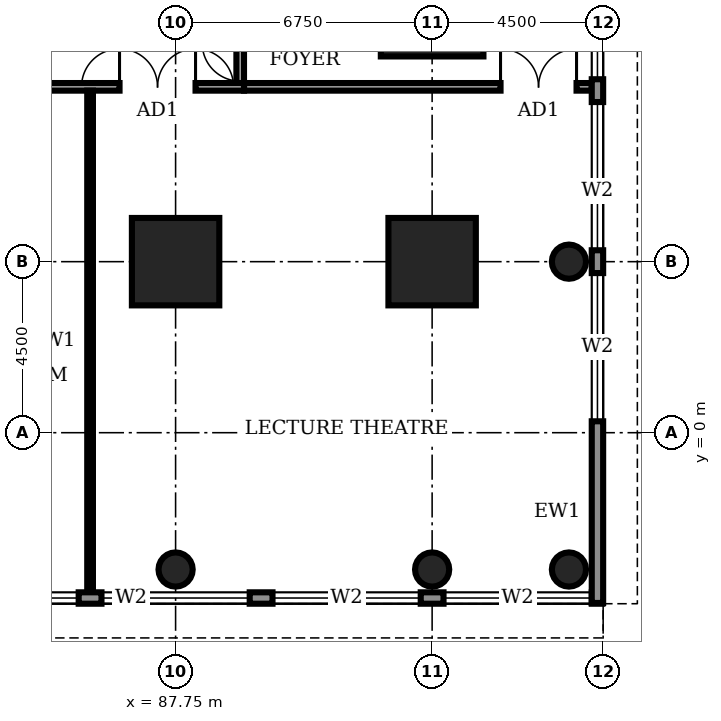
"""IFC4 building model, lengths in metres.
Left out: names, types, materials, properties, quantities, classifications, styles, units other than length and angle.
Written with IfcOpenShell. Run it as: python <this file> out.ifc"""

import sys

from ifc_helpers import new_model, si_unit, direction, frame, frame_2d, origin, origin_2d, place, context, subcontext, project, spatial, rectangle, circle, extrude, element, fill, save


model = new_model("IFC4")
c1 = context("Model", 3, precision=1e-05, world=origin(), true_north=direction((0.0, 1.0)))
c2 = subcontext(c1, "Body", "Model", "MODEL_VIEW")
j1 = project(units=[si_unit("LENGTHUNIT", "METRE"), si_unit("PLANEANGLEUNIT", "RADIAN")], contexts=[c1])
p1 = place(None, origin())
s1 = spatial("IfcSite", under=j1, at=p1, CompositionType="ELEMENT")
p2 = place(p1, origin())
s2 = spatial("IfcBuilding", under=s1, at=p2, CompositionType="ELEMENT")
p3 = place(p2, frame((0.0, 0.0, 6.0)))
s3 = spatial("IfcBuildingStorey", under=s2, at=p3, CompositionType="ELEMENT", Elevation=6.0)
for number, where, z_axis, x_axis in (
    (1, (87.75, 4.5, 0.0), (0.0, 0.0, 1.0), (1.0, 0.0, 0.0)),
    (2, (94.5, 4.5, 0.0), (0.0, 0.0, 1.0), (1.0, 0.0, 0.0)),
):
    element("IfcColumn", number, at=place(p3, frame(where, z_axis=z_axis, x_axis=x_axis)), inside=s3, PredefinedType="COLUMN", context=c2, shape_type="SweptSolid", body=[
        extrude(rectangle(XDim=2.3, YDim=2.3, at=origin_2d()), origin(), (0.0, 0.0, 1.0), 5.0),
    ])
p4 = place(p3, frame((94.5, 11.25, 0.0), z_axis=(0.0, 0.0, 1.0), x_axis=(1.0, 0.0, 0.0)))
e3 = element("IfcColumn", 3, at=p4, inside=s3, PredefinedType="COLUMN", context=c2, shape_type="SweptSolid", body=[
    extrude(rectangle(XDim=2.7, YDim=2.7, at=origin_2d()), origin(), (0.0, 0.0, 1.0), 5.0),
])
for number, where, z_axis, x_axis in (
    (4, (87.75, -3.6, 0.0), (0.0, 0.0, 1.0), (1.0, 0.0, 0.0)),
    (5, (94.5, -3.6, 0.0), (0.0, 0.0, 1.0), (1.0, 0.0, 0.0)),
    (6, (98.1, -3.6, 0.0), (0.0, 0.0, 1.0), (1.0, 0.0, 0.0)),
    (7, (98.1, 4.5, 0.0), (0.0, 0.0, 1.0), (1.0, 0.0, 0.0)),
):
    element("IfcColumn", number, at=place(p3, frame(where, z_axis=z_axis, x_axis=x_axis)), inside=s3, PredefinedType="COLUMN", context=c2, shape_type="SweptSolid", body=[
        extrude(circle(Radius=0.45, at=origin_2d()), origin(), (0.0, 0.0, 1.0), 5.0),
    ])
p5 = place(p3, frame((0.02, -4.35, 0.0), z_axis=(0.0, 0.0, 1.0), x_axis=(1.0, 0.0, 0.0)))
e8 = element("IfcWall", 8, at=p5, inside=s3, PredefinedType="STANDARD", context=c2, shape_type="SweptSolid", body=[
    extrude(rectangle(XDim=98.96, YDim=0.3, at=frame_2d((49.48, 0.0))), origin(), (0.0, 0.0, 1.0), 4.7),
])
p6 = place(p5, frame((4.78, 0.0, 0.6)))
e9 = element("IfcOpeningElement", 9, at=p6, cuts=e8, PredefinedType="OPENING", context=c2, shape_type="SweptSolid", body=[
    extrude(rectangle(XDim=3.9, YDim=2.6, at=frame_2d((1.95, 1.3))), frame((0.0, 0.16, 0.0), z_axis=(0.0, -1.0, 0.0), x_axis=(1.0, 0.0, 0.0)), (0.0, 0.0, 1.0), 0.32),
])
p7 = place(p5, frame((9.28, 0.0, 0.6)))
e10 = element("IfcOpeningElement", 10, at=p7, cuts=e8, PredefinedType="OPENING", context=c2, shape_type="SweptSolid", body=[
    extrude(rectangle(XDim=3.9, YDim=2.6, at=frame_2d((1.95, 1.3))), frame((0.0, 0.16, 0.0), z_axis=(0.0, -1.0, 0.0), x_axis=(1.0, 0.0, 0.0)), (0.0, 0.0, 1.0), 0.32),
])
p8 = place(p5, frame((13.78, 0.0, 0.6)))
e11 = element("IfcOpeningElement", 11, at=p8, cuts=e8, PredefinedType="OPENING", context=c2, shape_type="SweptSolid", body=[
    extrude(rectangle(XDim=3.9, YDim=2.6, at=frame_2d((1.95, 1.3))), frame((0.0, 0.16, 0.0), z_axis=(0.0, -1.0, 0.0), x_axis=(1.0, 0.0, 0.0)), (0.0, 0.0, 1.0), 0.32),
])
p9 = place(p5, frame((18.28, 0.0, 0.6)))
e12 = element("IfcOpeningElement", 12, at=p9, cuts=e8, PredefinedType="OPENING", context=c2, shape_type="SweptSolid", body=[
    extrude(rectangle(XDim=3.9, YDim=2.6, at=frame_2d((1.95, 1.3))), frame((0.0, 0.16, 0.0), z_axis=(0.0, -1.0, 0.0), x_axis=(1.0, 0.0, 0.0)), (0.0, 0.0, 1.0), 0.32),
])
p10 = place(p5, frame((22.78, 0.0, 0.6)))
e13 = element("IfcOpeningElement", 13, at=p10, cuts=e8, PredefinedType="OPENING", context=c2, shape_type="SweptSolid", body=[
    extrude(rectangle(XDim=3.9, YDim=2.6, at=frame_2d((1.95, 1.3))), frame((0.0, 0.16, 0.0), z_axis=(0.0, -1.0, 0.0), x_axis=(1.0, 0.0, 0.0)), (0.0, 0.0, 1.0), 0.32),
])
p11 = place(p5, frame((27.28, 0.0, 0.6)))
e14 = element("IfcOpeningElement", 14, at=p11, cuts=e8, PredefinedType="OPENING", context=c2, shape_type="SweptSolid", body=[
    extrude(rectangle(XDim=3.9, YDim=2.6, at=frame_2d((1.95, 1.3))), frame((0.0, 0.16, 0.0), z_axis=(0.0, -1.0, 0.0), x_axis=(1.0, 0.0, 0.0)), (0.0, 0.0, 1.0), 0.32),
])
p12 = place(p5, frame((31.78, 0.0, 0.6)))
e15 = element("IfcOpeningElement", 15, at=p12, cuts=e8, PredefinedType="OPENING", context=c2, shape_type="SweptSolid", body=[
    extrude(rectangle(XDim=3.9, YDim=2.6, at=frame_2d((1.95, 1.3))), frame((0.0, 0.16, 0.0), z_axis=(0.0, -1.0, 0.0), x_axis=(1.0, 0.0, 0.0)), (0.0, 0.0, 1.0), 0.32),
])
p13 = place(p5, frame((36.28, 0.0, 0.6)))
e16 = element("IfcOpeningElement", 16, at=p13, cuts=e8, PredefinedType="OPENING", context=c2, shape_type="SweptSolid", body=[
    extrude(rectangle(XDim=3.9, YDim=2.6, at=frame_2d((1.95, 1.3))), frame((0.0, 0.16, 0.0), z_axis=(0.0, -1.0, 0.0), x_axis=(1.0, 0.0, 0.0)), (0.0, 0.0, 1.0), 0.32),
])
p14 = place(p5, frame((40.78, 0.0, 0.6)))
e17 = element("IfcOpeningElement", 17, at=p14, cuts=e8, PredefinedType="OPENING", context=c2, shape_type="SweptSolid", body=[
    extrude(rectangle(XDim=3.9, YDim=2.6, at=frame_2d((1.95, 1.3))), frame((0.0, 0.16, 0.0), z_axis=(0.0, -1.0, 0.0), x_axis=(1.0, 0.0, 0.0)), (0.0, 0.0, 1.0), 0.32),
])
p15 = place(p5, frame((45.28, 0.0, 0.6)))
e18 = element("IfcOpeningElement", 18, at=p15, cuts=e8, PredefinedType="OPENING", context=c2, shape_type="SweptSolid", body=[
    extrude(rectangle(XDim=3.9, YDim=2.6, at=frame_2d((1.95, 1.3))), frame((0.0, 0.16, 0.0), z_axis=(0.0, -1.0, 0.0), x_axis=(1.0, 0.0, 0.0)), (0.0, 0.0, 1.0), 0.32),
])
p16 = place(p5, frame((49.78, 0.0, 0.6)))
e19 = element("IfcOpeningElement", 19, at=p16, cuts=e8, PredefinedType="OPENING", context=c2, shape_type="SweptSolid", body=[
    extrude(rectangle(XDim=3.9, YDim=2.6, at=frame_2d((1.95, 1.3))), frame((0.0, 0.16, 0.0), z_axis=(0.0, -1.0, 0.0), x_axis=(1.0, 0.0, 0.0)), (0.0, 0.0, 1.0), 0.32),
])
p17 = place(p5, frame((54.28, 0.0, 0.6)))
e20 = element("IfcOpeningElement", 20, at=p17, cuts=e8, PredefinedType="OPENING", context=c2, shape_type="SweptSolid", body=[
    extrude(rectangle(XDim=3.9, YDim=2.6, at=frame_2d((1.95, 1.3))), frame((0.0, 0.16, 0.0), z_axis=(0.0, -1.0, 0.0), x_axis=(1.0, 0.0, 0.0)), (0.0, 0.0, 1.0), 0.32),
])
p18 = place(p5, frame((58.78, 0.0, 0.6)))
e21 = element("IfcOpeningElement", 21, at=p18, cuts=e8, PredefinedType="OPENING", context=c2, shape_type="SweptSolid", body=[
    extrude(rectangle(XDim=3.9, YDim=2.6, at=frame_2d((1.95, 1.3))), frame((0.0, 0.16, 0.0), z_axis=(0.0, -1.0, 0.0), x_axis=(1.0, 0.0, 0.0)), (0.0, 0.0, 1.0), 0.32),
])
p19 = place(p5, frame((63.28, 0.0, 0.6)))
e22 = element("IfcOpeningElement", 22, at=p19, cuts=e8, PredefinedType="OPENING", context=c2, shape_type="SweptSolid", body=[
    extrude(rectangle(XDim=3.9, YDim=2.6, at=frame_2d((1.95, 1.3))), frame((0.0, 0.16, 0.0), z_axis=(0.0, -1.0, 0.0), x_axis=(1.0, 0.0, 0.0)), (0.0, 0.0, 1.0), 0.32),
])
p20 = place(p5, frame((67.78, 0.0, 0.6)))
e23 = element("IfcOpeningElement", 23, at=p20, cuts=e8, PredefinedType="OPENING", context=c2, shape_type="SweptSolid", body=[
    extrude(rectangle(XDim=3.9, YDim=2.6, at=frame_2d((1.95, 1.3))), frame((0.0, 0.16, 0.0), z_axis=(0.0, -1.0, 0.0), x_axis=(1.0, 0.0, 0.0)), (0.0, 0.0, 1.0), 0.32),
])
p21 = place(p5, frame((72.28, 0.0, 0.6)))
e24 = element("IfcOpeningElement", 24, at=p21, cuts=e8, PredefinedType="OPENING", context=c2, shape_type="SweptSolid", body=[
    extrude(rectangle(XDim=3.9, YDim=2.6, at=frame_2d((1.95, 1.3))), frame((0.0, 0.16, 0.0), z_axis=(0.0, -1.0, 0.0), x_axis=(1.0, 0.0, 0.0)), (0.0, 0.0, 1.0), 0.32),
])
p22 = place(p5, frame((76.78, 0.0, 0.6)))
e25 = element("IfcOpeningElement", 25, at=p22, cuts=e8, PredefinedType="OPENING", context=c2, shape_type="SweptSolid", body=[
    extrude(rectangle(XDim=3.9, YDim=2.6, at=frame_2d((1.95, 1.3))), frame((0.0, 0.16, 0.0), z_axis=(0.0, -1.0, 0.0), x_axis=(1.0, 0.0, 0.0)), (0.0, 0.0, 1.0), 0.32),
])
p23 = place(p5, frame((81.28, 0.0, 0.6)))
e26 = element("IfcOpeningElement", 26, at=p23, cuts=e8, PredefinedType="OPENING", context=c2, shape_type="SweptSolid", body=[
    extrude(rectangle(XDim=3.9, YDim=2.6, at=frame_2d((1.95, 1.3))), frame((0.0, 0.16, 0.0), z_axis=(0.0, -1.0, 0.0), x_axis=(1.0, 0.0, 0.0)), (0.0, 0.0, 1.0), 0.32),
])
p24 = place(p5, frame((85.78, 0.0, 0.6)))
e27 = element("IfcOpeningElement", 27, at=p24, cuts=e8, PredefinedType="OPENING", context=c2, shape_type="SweptSolid", body=[
    extrude(rectangle(XDim=3.9, YDim=2.6, at=frame_2d((1.95, 1.3))), frame((0.0, 0.16, 0.0), z_axis=(0.0, -1.0, 0.0), x_axis=(1.0, 0.0, 0.0)), (0.0, 0.0, 1.0), 0.32),
])
p25 = place(p5, frame((90.28, 0.0, 0.6)))
e28 = element("IfcOpeningElement", 28, at=p25, cuts=e8, PredefinedType="OPENING", context=c2, shape_type="SweptSolid", body=[
    extrude(rectangle(XDim=3.9, YDim=2.6, at=frame_2d((1.95, 1.3))), frame((0.0, 0.16, 0.0), z_axis=(0.0, -1.0, 0.0), x_axis=(1.0, 0.0, 0.0)), (0.0, 0.0, 1.0), 0.32),
])
p26 = place(p5, frame((94.78, 0.0, 0.6)))
e29 = element("IfcOpeningElement", 29, at=p26, cuts=e8, PredefinedType="OPENING", context=c2, shape_type="SweptSolid", body=[
    extrude(rectangle(XDim=3.9, YDim=2.6, at=frame_2d((1.95, 1.3))), frame((0.0, 0.16, 0.0), z_axis=(0.0, -1.0, 0.0), x_axis=(1.0, 0.0, 0.0)), (0.0, 0.0, 1.0), 0.32),
])
p27 = place(p3, frame((98.85, -4.48, 0.0), z_axis=(0.0, 0.0, 1.0), x_axis=(0.0, 1.0, 0.0)))
e30 = element("IfcWall", 30, at=p27, inside=s3, PredefinedType="STANDARD", context=c2, shape_type="SweptSolid", body=[
    extrude(rectangle(XDim=53.96, YDim=0.3, at=frame_2d((26.98, 0.0))), origin(), (0.0, 0.0, 1.0), 4.7),
])
p28 = place(p27, frame((4.78, 0.0, 0.6)))
e31 = element("IfcOpeningElement", 31, at=p28, cuts=e30, PredefinedType="OPENING", context=c2, shape_type="SweptSolid", body=[
    extrude(rectangle(XDim=3.9, YDim=2.6, at=frame_2d((1.95, 1.3))), frame((0.0, 0.16, 0.0), z_axis=(0.0, -1.0, 0.0), x_axis=(1.0, 0.0, 0.0)), (0.0, 0.0, 1.0), 0.32),
])
p29 = place(p27, frame((9.28, 0.0, 0.6)))
e32 = element("IfcOpeningElement", 32, at=p29, cuts=e30, PredefinedType="OPENING", context=c2, shape_type="SweptSolid", body=[
    extrude(rectangle(XDim=3.9, YDim=2.6, at=frame_2d((1.95, 1.3))), frame((0.0, 0.16, 0.0), z_axis=(0.0, -1.0, 0.0), x_axis=(1.0, 0.0, 0.0)), (0.0, 0.0, 1.0), 0.32),
])
p30 = place(p27, frame((13.78, 0.0, 0.6)))
e33 = element("IfcOpeningElement", 33, at=p30, cuts=e30, PredefinedType="OPENING", context=c2, shape_type="SweptSolid", body=[
    extrude(rectangle(XDim=3.9, YDim=2.6, at=frame_2d((1.95, 1.3))), frame((0.0, 0.16, 0.0), z_axis=(0.0, -1.0, 0.0), x_axis=(1.0, 0.0, 0.0)), (0.0, 0.0, 1.0), 0.32),
])
p31 = place(p27, frame((18.28, 0.0, 0.6)))
e34 = element("IfcOpeningElement", 34, at=p31, cuts=e30, PredefinedType="OPENING", context=c2, shape_type="SweptSolid", body=[
    extrude(rectangle(XDim=3.9, YDim=2.6, at=frame_2d((1.95, 1.3))), frame((0.0, 0.16, 0.0), z_axis=(0.0, -1.0, 0.0), x_axis=(1.0, 0.0, 0.0)), (0.0, 0.0, 1.0), 0.32),
])
p32 = place(p27, frame((22.78, 0.0, 0.6)))
e35 = element("IfcOpeningElement", 35, at=p32, cuts=e30, PredefinedType="OPENING", context=c2, shape_type="SweptSolid", body=[
    extrude(rectangle(XDim=3.9, YDim=2.6, at=frame_2d((1.95, 1.3))), frame((0.0, 0.16, 0.0), z_axis=(0.0, -1.0, 0.0), x_axis=(1.0, 0.0, 0.0)), (0.0, 0.0, 1.0), 0.32),
])
p33 = place(p27, frame((27.28, 0.0, 0.6)))
e36 = element("IfcOpeningElement", 36, at=p33, cuts=e30, PredefinedType="OPENING", context=c2, shape_type="SweptSolid", body=[
    extrude(rectangle(XDim=3.9, YDim=2.6, at=frame_2d((1.95, 1.3))), frame((0.0, 0.16, 0.0), z_axis=(0.0, -1.0, 0.0), x_axis=(1.0, 0.0, 0.0)), (0.0, 0.0, 1.0), 0.32),
])
p34 = place(p27, frame((31.78, 0.0, 0.6)))
e37 = element("IfcOpeningElement", 37, at=p34, cuts=e30, PredefinedType="OPENING", context=c2, shape_type="SweptSolid", body=[
    extrude(rectangle(XDim=3.9, YDim=2.6, at=frame_2d((1.95, 1.3))), frame((0.0, 0.16, 0.0), z_axis=(0.0, -1.0, 0.0), x_axis=(1.0, 0.0, 0.0)), (0.0, 0.0, 1.0), 0.32),
])
p35 = place(p27, frame((36.28, 0.0, 0.6)))
e38 = element("IfcOpeningElement", 38, at=p35, cuts=e30, PredefinedType="OPENING", context=c2, shape_type="SweptSolid", body=[
    extrude(rectangle(XDim=3.9, YDim=2.6, at=frame_2d((1.95, 1.3))), frame((0.0, 0.16, 0.0), z_axis=(0.0, -1.0, 0.0), x_axis=(1.0, 0.0, 0.0)), (0.0, 0.0, 1.0), 0.32),
])
p36 = place(p27, frame((40.78, 0.0, 0.6)))
e39 = element("IfcOpeningElement", 39, at=p36, cuts=e30, PredefinedType="OPENING", context=c2, shape_type="SweptSolid", body=[
    extrude(rectangle(XDim=3.9, YDim=2.6, at=frame_2d((1.95, 1.3))), frame((0.0, 0.16, 0.0), z_axis=(0.0, -1.0, 0.0), x_axis=(1.0, 0.0, 0.0)), (0.0, 0.0, 1.0), 0.32),
])
p37 = place(p27, frame((45.28, 0.0, 0.6)))
e40 = element("IfcOpeningElement", 40, at=p37, cuts=e30, PredefinedType="OPENING", context=c2, shape_type="SweptSolid", body=[
    extrude(rectangle(XDim=3.9, YDim=2.6, at=frame_2d((1.95, 1.3))), frame((0.0, 0.16, 0.0), z_axis=(0.0, -1.0, 0.0), x_axis=(1.0, 0.0, 0.0)), (0.0, 0.0, 1.0), 0.32),
])
p38 = place(p27, frame((49.78, 0.0, 0.6)))
e41 = element("IfcOpeningElement", 41, at=p38, cuts=e30, PredefinedType="OPENING", context=c2, shape_type="SweptSolid", body=[
    extrude(rectangle(XDim=3.9, YDim=2.6, at=frame_2d((1.95, 1.3))), frame((0.0, 0.16, 0.0), z_axis=(0.0, -1.0, 0.0), x_axis=(1.0, 0.0, 0.0)), (0.0, 0.0, 1.0), 0.32),
])
p39 = place(p3, frame((72.65, 9.1, 0.0), z_axis=(0.0, 0.0, 1.0), x_axis=(1.0, 0.0, 0.0)))
e42 = element("IfcWall", 42, at=p39, inside=s3, PredefinedType="SOLIDWALL", context=c2, shape_type="SweptSolid", body=[
    extrude(rectangle(XDim=16.9, YDim=0.2, at=frame_2d((8.45, 0.0))), origin(), (0.0, 0.0, 1.0), 4.7),
])
p40 = place(p39, frame((0.975, 0.0, 0.0)))
e43 = element("IfcOpeningElement", 43, at=p40, cuts=e42, PredefinedType="OPENING", context=c2, shape_type="SweptSolid", body=[
    extrude(rectangle(XDim=1.8, YDim=2.1, at=frame_2d((0.9, 1.05))), frame((0.0, 0.11, 0.0), z_axis=(0.0, -1.0, 0.0), x_axis=(1.0, 0.0, 0.0)), (0.0, 0.0, 1.0), 0.22),
])
p41 = place(p39, frame((7.35, 0.0, 0.0)))
e44 = element("IfcOpeningElement", 44, at=p41, cuts=e42, PredefinedType="OPENING", context=c2, shape_type="SweptSolid", body=[
    extrude(rectangle(XDim=2.0, YDim=2.4, at=frame_2d((1.0, 1.2))), frame((0.0, 0.11, 0.0), z_axis=(0.0, -1.0, 0.0), x_axis=(1.0, 0.0, 0.0)), (0.0, 0.0, 1.0), 0.22),
])
p42 = place(p39, frame((13.625, 0.0, 0.0)))
e45 = element("IfcOpeningElement", 45, at=p42, cuts=e42, PredefinedType="OPENING", context=c2, shape_type="SweptSolid", body=[
    extrude(rectangle(XDim=2.0, YDim=2.4, at=frame_2d((1.0, 1.2))), frame((0.0, 0.11, 0.0), z_axis=(0.0, -1.0, 0.0), x_axis=(1.0, 0.0, 0.0)), (0.0, 0.0, 1.0), 0.22),
])
p43 = place(p3, frame((89.45, 9.2, 0.0), z_axis=(0.0, 0.0, 1.0), x_axis=(0.0, 1.0, 0.0)))
e46 = element("IfcWall", 46, at=p43, inside=s3, PredefinedType="SOLIDWALL", context=c2, shape_type="SweptSolid", body=[
    extrude(rectangle(XDim=22.3, YDim=0.2, at=frame_2d((11.15, 0.0))), origin(), (0.0, 0.0, 1.0), 4.7),
])
p44 = place(p43, frame((1.05, 0.0, 0.0)))
e47 = element("IfcOpeningElement", 47, at=p44, cuts=e46, PredefinedType="OPENING", context=c2, shape_type="SweptSolid", body=[
    extrude(rectangle(XDim=2.0, YDim=2.4, at=frame_2d((1.0, 1.2))), frame((0.0, 0.11, 0.0), z_axis=(0.0, -1.0, 0.0), x_axis=(1.0, 0.0, 0.0)), (0.0, 0.0, 1.0), 0.22),
])
p45 = place(p43, frame((5.75, 0.0, 0.0)))
e48 = element("IfcOpeningElement", 48, at=p45, cuts=e46, PredefinedType="OPENING", context=c2, shape_type="SweptSolid", body=[
    extrude(rectangle(XDim=0.9, YDim=2.1, at=frame_2d((0.45, 1.05))), frame((0.0, 0.11, 0.0), z_axis=(0.0, -1.0, 0.0), x_axis=(1.0, 0.0, 0.0)), (0.0, 0.0, 1.0), 0.22),
])
p46 = place(p43, frame((8.75, 0.0, 0.0)))
e49 = element("IfcOpeningElement", 49, at=p46, cuts=e46, PredefinedType="OPENING", context=c2, shape_type="SweptSolid", body=[
    extrude(rectangle(XDim=0.9, YDim=2.1, at=frame_2d((0.45, 1.05))), frame((0.0, 0.11, 0.0), z_axis=(0.0, -1.0, 0.0), x_axis=(1.0, 0.0, 0.0)), (0.0, 0.0, 1.0), 0.22),
])
p47 = place(p43, frame((13.6, 0.0, 0.0)))
e50 = element("IfcOpeningElement", 50, at=p47, cuts=e46, PredefinedType="OPENING", context=c2, shape_type="SweptSolid", body=[
    extrude(rectangle(XDim=0.9, YDim=2.1, at=frame_2d((0.45, 1.05))), frame((0.0, 0.11, 0.0), z_axis=(0.0, -1.0, 0.0), x_axis=(1.0, 0.0, 0.0)), (0.0, 0.0, 1.0), 0.22),
])
p48 = place(p43, frame((16.3, 0.0, 0.0)))
e51 = element("IfcOpeningElement", 51, at=p48, cuts=e46, PredefinedType="OPENING", context=c2, shape_type="SweptSolid", body=[
    extrude(rectangle(XDim=1.0, YDim=2.1, at=frame_2d((0.5, 1.05))), frame((0.0, 0.11, 0.0), z_axis=(0.0, -1.0, 0.0), x_axis=(1.0, 0.0, 0.0)), (0.0, 0.0, 1.0), 0.22),
])
p49 = place(p43, frame((10.8, 0.0, 0.0)))
e52 = element("IfcOpeningElement", 52, at=p49, cuts=e46, PredefinedType="OPENING", context=c2, shape_type="SweptSolid", body=[
    extrude(rectangle(XDim=1.0, YDim=2.1, at=frame_2d((0.5, 1.05))), frame((0.0, 0.11, 0.0), z_axis=(0.0, -1.0, 0.0), x_axis=(1.0, 0.0, 0.0)), (0.0, 0.0, 1.0), 0.22),
])
p50 = place(p43, frame((19.55, 0.0, 0.0)))
e53 = element("IfcOpeningElement", 53, at=p50, cuts=e46, PredefinedType="OPENING", context=c2, shape_type="SweptSolid", body=[
    extrude(rectangle(XDim=1.0, YDim=2.1, at=frame_2d((0.5, 1.05))), frame((0.0, 0.11, 0.0), z_axis=(0.0, -1.0, 0.0), x_axis=(1.0, 0.0, 0.0)), (0.0, 0.0, 1.0), 0.22),
])
p51 = place(p3, frame((89.55, 9.1, 0.0), z_axis=(0.0, 0.0, 1.0), x_axis=(1.0, 0.0, 0.0)))
e54 = element("IfcWall", 54, at=p51, inside=s3, PredefinedType="SOLIDWALL", context=c2, shape_type="SweptSolid", body=[
    extrude(rectangle(XDim=9.15, YDim=0.2, at=frame_2d((4.575, 0.0))), origin(), (0.0, 0.0, 1.0), 4.7),
])
p52 = place(p51, frame((6.75, 0.0, 0.0)))
e55 = element("IfcOpeningElement", 55, at=p52, cuts=e54, PredefinedType="OPENING", context=c2, shape_type="SweptSolid", body=[
    extrude(rectangle(XDim=2.0, YDim=2.4, at=frame_2d((1.0, 1.2))), frame((0.0, 0.11, 0.0), z_axis=(0.0, -1.0, 0.0), x_axis=(1.0, 0.0, 0.0)), (0.0, 0.0, 1.0), 0.22),
])
p53 = place(p3, frame((85.5, -4.2, 0.0), z_axis=(0.0, 0.0, 1.0), x_axis=(0.0, 1.0, 0.0)))
e56 = element("IfcWall", 56, at=p53, inside=s3, PredefinedType="PARTITIONING", context=c2, shape_type="SweptSolid", body=[
    extrude(rectangle(XDim=13.2, YDim=0.15, at=frame_2d((6.6, 0.0))), origin(), (0.0, 0.0, 1.0), 4.7),
])
p54 = place(p23, origin())
e57 = element("IfcWindow", 57, at=p54, inside=s3, PartitioningType="SINGLE_PANEL", PredefinedType="WINDOW", context=c2, shape_type="SweptSolid", body=[
    extrude(rectangle(XDim=3.9, YDim=2.6, at=frame_2d((1.95, 1.3))), frame((0.0, 0.03, 0.0), z_axis=(0.0, -1.0, 0.0), x_axis=(1.0, 0.0, 0.0)), (0.0, 0.0, 1.0), 0.06),
])
fill(e26, e57)
p55 = place(p24, origin())
e58 = element("IfcWindow", 58, at=p55, inside=s3, PartitioningType="SINGLE_PANEL", PredefinedType="WINDOW", context=c2, shape_type="SweptSolid", body=[
    extrude(rectangle(XDim=3.9, YDim=2.6, at=frame_2d((1.95, 1.3))), frame((0.0, 0.03, 0.0), z_axis=(0.0, -1.0, 0.0), x_axis=(1.0, 0.0, 0.0)), (0.0, 0.0, 1.0), 0.06),
])
fill(e27, e58)
p56 = place(p25, origin())
e59 = element("IfcWindow", 59, at=p56, inside=s3, PartitioningType="SINGLE_PANEL", PredefinedType="WINDOW", context=c2, shape_type="SweptSolid", body=[
    extrude(rectangle(XDim=3.9, YDim=2.6, at=frame_2d((1.95, 1.3))), frame((0.0, 0.03, 0.0), z_axis=(0.0, -1.0, 0.0), x_axis=(1.0, 0.0, 0.0)), (0.0, 0.0, 1.0), 0.06),
])
fill(e28, e59)
p57 = place(p26, origin())
e60 = element("IfcWindow", 60, at=p57, inside=s3, PartitioningType="SINGLE_PANEL", PredefinedType="WINDOW", context=c2, shape_type="SweptSolid", body=[
    extrude(rectangle(XDim=3.9, YDim=2.6, at=frame_2d((1.95, 1.3))), frame((0.0, 0.03, 0.0), z_axis=(0.0, -1.0, 0.0), x_axis=(1.0, 0.0, 0.0)), (0.0, 0.0, 1.0), 0.06),
])
fill(e29, e60)
p58 = place(p28, origin())
e61 = element("IfcWindow", 61, at=p58, inside=s3, PartitioningType="SINGLE_PANEL", PredefinedType="WINDOW", context=c2, shape_type="SweptSolid", body=[
    extrude(rectangle(XDim=3.9, YDim=2.6, at=frame_2d((1.95, 1.3))), frame((0.0, 0.03, 0.0), z_axis=(0.0, -1.0, 0.0), x_axis=(1.0, 0.0, 0.0)), (0.0, 0.0, 1.0), 0.06),
])
fill(e31, e61)
p59 = place(p29, origin())
e62 = element("IfcWindow", 62, at=p59, inside=s3, PartitioningType="SINGLE_PANEL", PredefinedType="WINDOW", context=c2, shape_type="SweptSolid", body=[
    extrude(rectangle(XDim=3.9, YDim=2.6, at=frame_2d((1.95, 1.3))), frame((0.0, 0.03, 0.0), z_axis=(0.0, -1.0, 0.0), x_axis=(1.0, 0.0, 0.0)), (0.0, 0.0, 1.0), 0.06),
])
fill(e32, e62)
p60 = place(p30, origin())
e63 = element("IfcWindow", 63, at=p60, inside=s3, PartitioningType="SINGLE_PANEL", PredefinedType="WINDOW", context=c2, shape_type="SweptSolid", body=[
    extrude(rectangle(XDim=3.9, YDim=2.6, at=frame_2d((1.95, 1.3))), frame((0.0, 0.03, 0.0), z_axis=(0.0, -1.0, 0.0), x_axis=(1.0, 0.0, 0.0)), (0.0, 0.0, 1.0), 0.06),
])
fill(e33, e63)
p61 = place(p42, origin())
e64 = element("IfcDoor", 64, at=p61, inside=s3, OperationType="DOUBLE_DOOR_SINGLE_SWING", PredefinedType="DOOR", context=c2, shape_type="SweptSolid", body=[
    extrude(rectangle(XDim=2.0, YDim=2.4, at=frame_2d((1.0, 1.2))), frame((0.0, 0.025, 0.0), z_axis=(0.0, -1.0, 0.0), x_axis=(1.0, 0.0, 0.0)), (0.0, 0.0, 1.0), 0.05),
])
fill(e45, e64)
p62 = place(p52, origin())
e65 = element("IfcDoor", 65, at=p62, inside=s3, OperationType="DOUBLE_DOOR_SINGLE_SWING", PredefinedType="DOOR", context=c2, shape_type="SweptSolid", body=[
    extrude(rectangle(XDim=2.0, YDim=2.4, at=frame_2d((1.0, 1.2))), frame((0.0, 0.025, 0.0), z_axis=(0.0, -1.0, 0.0), x_axis=(1.0, 0.0, 0.0)), (0.0, 0.0, 1.0), 0.05),
])
fill(e55, e65)
save(model, sys.argv[1])
